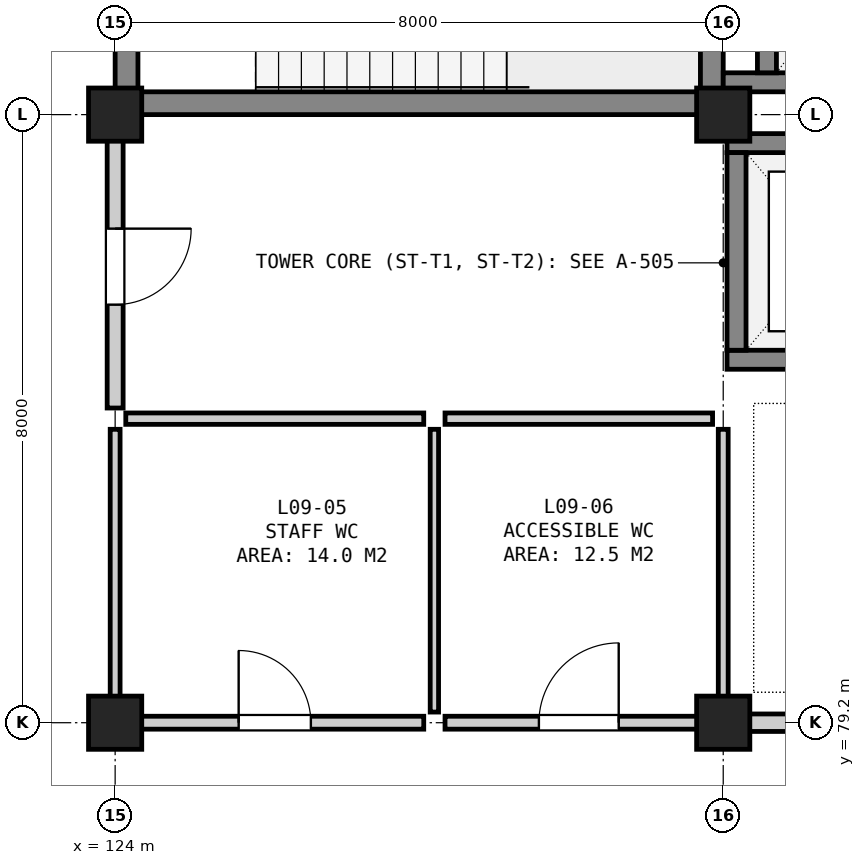
"""IFC4 building model, lengths in metres.
Left out: names, types, materials, properties, quantities, classifications, styles, units other than length and angle.
Written with IfcOpenShell. Run it as: python <this file> out.ifc"""

import sys

from ifc_helpers import new_model, si_unit, direction, frame, frame_2d, origin, origin_2d, place, context, subcontext, project, spatial, rectangle, extrude, element, fill, save


model = new_model("IFC4")
c1 = context("Model", 3, precision=1e-05, world=origin(), true_north=direction((0.0, 1.0)))
c2 = subcontext(c1, "Body", "Model", "MODEL_VIEW")
j1 = project(units=[si_unit("LENGTHUNIT", "METRE"), si_unit("PLANEANGLEUNIT", "RADIAN")], contexts=[c1])
p1 = place(None, origin())
s1 = spatial("IfcSite", under=j1, at=p1, CompositionType="ELEMENT")
p2 = place(p1, origin())
s2 = spatial("IfcBuilding", under=s1, at=p2, CompositionType="ELEMENT")
p3 = place(p2, frame((0.0, 0.0, 39.5)))
s3 = spatial("IfcBuildingStorey", under=s2, at=p3, CompositionType="ELEMENT", Elevation=39.5)
for number, where, z_axis, x_axis in (
    (1, (124.0, 79.2, 0.0), (0.0, 0.0, 1.0), (1.0, 0.0, 0.0)),
    (2, (124.0, 87.2, 0.0), (0.0, 0.0, 1.0), (1.0, 0.0, 0.0)),
    (3, (132.0, 79.2, 0.0), (0.0, 0.0, 1.0), (1.0, 0.0, 0.0)),
    (4, (132.0, 87.2, 0.0), (0.0, 0.0, 1.0), (1.0, 0.0, 0.0)),
):
    element("IfcColumn", number, at=place(p3, frame(where, z_axis=z_axis, x_axis=x_axis)), inside=s3, PredefinedType="COLUMN", context=c2, shape_type="SweptSolid", body=[
        extrude(rectangle(XDim=0.7, YDim=0.7, at=origin_2d()), origin(), (0.0, 0.0, 1.0), 3.8),
    ])
for number, where, z_axis, x_axis in (
    (5, (124.15, 87.2, 0.0), (0.0, 0.0, 1.0), (0.0, 1.0, 0.0)),
    (6, (131.85, 87.2, 0.0), (0.0, 0.0, 1.0), (0.0, 1.0, 0.0)),
):
    element("IfcWall", number, at=place(p3, frame(where, z_axis=z_axis, x_axis=x_axis)), inside=s3, PredefinedType="SHEAR", context=c2, shape_type="SweptSolid", body=[
        extrude(rectangle(XDim=4.2, YDim=0.3, at=frame_2d((2.1, 0.0))), origin(), (0.0, 0.0, 1.0), 3.52),
    ])
p4 = place(p3, frame((124.3, 87.35, 0.0), z_axis=(0.0, 0.0, 1.0), x_axis=(1.0, 0.0, 0.0)))
e7 = element("IfcWall", 7, at=p4, inside=s3, PredefinedType="SHEAR", context=c2, shape_type="SweptSolid", body=[
    extrude(rectangle(XDim=7.4, YDim=0.3, at=frame_2d((3.7, 0.0))), origin(), (0.0, 0.0, 1.0), 3.52),
])
p5 = place(p3, frame((132.0, 87.625, 0.0), z_axis=(0.0, 0.0, 1.0), x_axis=(1.0, 0.0, 0.0)))
e8 = element("IfcWall", 8, at=p5, inside=s3, PredefinedType="SHEAR", context=c2, shape_type="SweptSolid", body=[
    extrude(rectangle(XDim=3.15, YDim=0.25, at=frame_2d((1.575, 0.0))), origin(), (0.0, 0.0, 1.0), 3.52),
])
p6 = place(p3, frame((132.575, 87.75, 0.0), z_axis=(0.0, 0.0, 1.0), x_axis=(0.0, 1.0, 0.0)))
e9 = element("IfcWall", 9, at=p6, inside=s3, PredefinedType="SHEAR", context=c2, shape_type="SweptSolid", body=[
    extrude(rectangle(XDim=2.9, YDim=0.25, at=frame_2d((1.45, 0.0))), origin(), (0.0, 0.0, 1.0), 3.52),
])
p7 = place(p3, frame((132.05, 83.975, 0.0), z_axis=(0.0, 0.0, 1.0), x_axis=(1.0, 0.0, 0.0)))
e10 = element("IfcWall", 10, at=p7, inside=s3, PredefinedType="SHEAR", context=c2, shape_type="SweptSolid", body=[
    extrude(rectangle(XDim=2.7, YDim=0.25, at=frame_2d((1.35, 0.0))), origin(), (0.0, 0.0, 1.0), 3.52),
])
p8 = place(p7, frame((0.8, 0.0, 0.0)))
e11 = element("IfcOpeningElement", 11, at=p8, cuts=e10, PredefinedType="OPENING", context=c2, shape_type="SweptSolid", body=[
    extrude(rectangle(XDim=1.1, YDim=2.15, at=frame_2d((0.55, 1.075))), frame((0.0, 0.137, 0.0), z_axis=(0.0, -1.0, 0.0), x_axis=(1.0, 0.0, 0.0)), (0.0, 0.0, 1.0), 0.274),
])
p9 = place(p3, frame((132.05, 86.825, 0.0), z_axis=(0.0, 0.0, 1.0), x_axis=(1.0, 0.0, 0.0)))
e12 = element("IfcWall", 12, at=p9, inside=s3, PredefinedType="SHEAR", context=c2, shape_type="SweptSolid", body=[
    extrude(rectangle(XDim=2.7, YDim=0.25, at=frame_2d((1.35, 0.0))), origin(), (0.0, 0.0, 1.0), 3.52),
])
p10 = place(p3, frame((132.175, 84.1, 0.0), z_axis=(0.0, 0.0, 1.0), x_axis=(0.0, 1.0, 0.0)))
e13 = element("IfcWall", 13, at=p10, inside=s3, PredefinedType="SHEAR", context=c2, shape_type="SweptSolid", body=[
    extrude(rectangle(XDim=2.6, YDim=0.25, at=frame_2d((1.3, 0.0))), origin(), (0.0, 0.0, 1.0), 3.52),
])
p11 = place(p3, frame((124.14, 79.2, 0.0), z_axis=(0.0, 0.0, 1.0), x_axis=(1.0, 0.0, 0.0)))
e14 = element("IfcWall", 14, at=p11, inside=s3, PredefinedType="PARTITIONING", context=c2, shape_type="SweptSolid", body=[
    extrude(rectangle(XDim=3.92, YDim=0.17, at=frame_2d((1.96, 0.0))), origin(), (0.0, 0.0, 1.0), 2.935),
])
p12 = place(p11, frame((1.485, 0.0, 0.0)))
e15 = element("IfcOpeningElement", 15, at=p12, cuts=e14, PredefinedType="OPENING", context=c2, shape_type="SweptSolid", body=[
    extrude(rectangle(XDim=0.95, YDim=2.15, at=frame_2d((0.475, 1.075))), frame((0.0, 0.097, 0.0), z_axis=(0.0, -1.0, 0.0), x_axis=(1.0, 0.0, 0.0)), (0.0, 0.0, 1.0), 0.194),
])
p13 = place(p3, frame((124.14, 83.2, 0.0), z_axis=(0.0, 0.0, 1.0), x_axis=(1.0, 0.0, 0.0)))
e16 = element("IfcWall", 16, at=p13, inside=s3, PredefinedType="PARTITIONING", context=c2, shape_type="SweptSolid", body=[
    extrude(rectangle(XDim=3.92, YDim=0.15, at=frame_2d((1.96, 0.0))), origin(), (0.0, 0.0, 1.0), 3.52),
])
p14 = place(p3, frame((124.0, 79.34, 0.0), z_axis=(0.0, 0.0, 1.0), x_axis=(0.0, 1.0, 0.0)))
e17 = element("IfcWall", 17, at=p14, inside=s3, PredefinedType="PARTITIONING", context=c2, shape_type="SweptSolid", body=[
    extrude(rectangle(XDim=3.72, YDim=0.13, at=frame_2d((1.86, 0.0))), origin(), (0.0, 0.0, 1.0), 3.035),
])
p15 = place(p3, frame((128.2, 79.34, 0.0), z_axis=(0.0, 0.0, 1.0), x_axis=(0.0, 1.0, 0.0)))
e18 = element("IfcWall", 18, at=p15, inside=s3, PredefinedType="PARTITIONING", context=c2, shape_type="SweptSolid", body=[
    extrude(rectangle(XDim=3.72, YDim=0.11, at=frame_2d((1.86, 0.0))), origin(), (0.0, 0.0, 1.0), 3.52),
])
p16 = place(p3, frame((128.34, 79.2, 0.0), z_axis=(0.0, 0.0, 1.0), x_axis=(1.0, 0.0, 0.0)))
e19 = element("IfcWall", 19, at=p16, inside=s3, PredefinedType="PARTITIONING", context=c2, shape_type="SweptSolid", body=[
    extrude(rectangle(XDim=3.52, YDim=0.17, at=frame_2d((1.76, 0.0))), origin(), (0.0, 0.0, 1.0), 2.935),
])
p17 = place(p16, frame((1.235, 0.0, 0.0)))
e20 = element("IfcOpeningElement", 20, at=p17, cuts=e19, PredefinedType="OPENING", context=c2, shape_type="SweptSolid", body=[
    extrude(rectangle(XDim=1.05, YDim=2.15, at=frame_2d((0.525, 1.075))), frame((0.0, 0.097, 0.0), z_axis=(0.0, -1.0, 0.0), x_axis=(1.0, 0.0, 0.0)), (0.0, 0.0, 1.0), 0.194),
])
p18 = place(p3, frame((128.34, 83.2, 0.0), z_axis=(0.0, 0.0, 1.0), x_axis=(1.0, 0.0, 0.0)))
e21 = element("IfcWall", 21, at=p18, inside=s3, PredefinedType="PARTITIONING", context=c2, shape_type="SweptSolid", body=[
    extrude(rectangle(XDim=3.52, YDim=0.15, at=frame_2d((1.76, 0.0))), origin(), (0.0, 0.0, 1.0), 3.52),
])
p19 = place(p3, frame((132.0, 79.34, 0.0), z_axis=(0.0, 0.0, 1.0), x_axis=(0.0, 1.0, 0.0)))
e22 = element("IfcWall", 22, at=p19, inside=s3, PredefinedType="PARTITIONING", context=c2, shape_type="SweptSolid", body=[
    extrude(rectangle(XDim=3.72, YDim=0.13, at=frame_2d((1.86, 0.0))), origin(), (0.0, 0.0, 1.0), 2.885),
])
p20 = place(p3, frame((124.0, 83.34, 0.0), z_axis=(0.0, 0.0, 1.0), x_axis=(0.0, 1.0, 0.0)))
e23 = element("IfcWall", 23, at=p20, inside=s3, PredefinedType="SOLIDWALL", context=c2, shape_type="SweptSolid", body=[
    extrude(rectangle(XDim=3.72, YDim=0.21, at=frame_2d((1.86, 0.0))), origin(), (0.0, 0.0, 1.0), 3.035),
])
p21 = place(p20, frame((1.36, 0.0, 0.0)))
e24 = element("IfcOpeningElement", 24, at=p21, cuts=e23, PredefinedType="OPENING", context=c2, shape_type="SweptSolid", body=[
    extrude(rectangle(XDim=1.0, YDim=2.15, at=frame_2d((0.5, 1.075))), frame((0.0, 0.117, 0.0), z_axis=(0.0, -1.0, 0.0), x_axis=(1.0, 0.0, 0.0)), (0.0, 0.0, 1.0), 0.234),
])
p22 = place(p3, frame((132.14, 79.2, 0.0), z_axis=(0.0, 0.0, 1.0), x_axis=(1.0, 0.0, 0.0)))
e25 = element("IfcWall", 25, at=p22, inside=s3, PredefinedType="SOLIDWALL", context=c2, shape_type="SweptSolid", body=[
    extrude(rectangle(XDim=7.72, YDim=0.23, at=frame_2d((3.86, 0.0))), origin(), (0.0, 0.0, 1.0), 2.985),
])
p23 = place(p22, frame((3.11, 0.0, 0.0)))
e26 = element("IfcOpeningElement", 26, at=p23, cuts=e25, PredefinedType="OPENING", context=c2, shape_type="SweptSolid", body=[
    extrude(rectangle(XDim=1.5, YDim=2.2, at=frame_2d((0.75, 1.1))), frame((0.0, 0.127, 0.0), z_axis=(0.0, -1.0, 0.0), x_axis=(1.0, 0.0, 0.0)), (0.0, 0.0, 1.0), 0.254),
])
p24 = place(p12, origin())
e27 = element("IfcDoor", 27, at=p24, inside=s3, OperationType="SINGLE_SWING_LEFT", PredefinedType="DOOR", context=c2, shape_type="SweptSolid", body=[
    extrude(rectangle(XDim=0.95, YDim=2.15, at=frame_2d((0.475, 1.075))), frame((0.0, 0.025, 0.0), z_axis=(0.0, -1.0, 0.0), x_axis=(1.0, 0.0, 0.0)), (0.0, 0.0, 1.0), 0.05),
])
fill(e15, e27)
p25 = place(p17, origin())
e28 = element("IfcDoor", 28, at=p25, inside=s3, OperationType="SINGLE_SWING_RIGHT", PredefinedType="DOOR", context=c2, shape_type="SweptSolid", body=[
    extrude(rectangle(XDim=1.05, YDim=2.15, at=frame_2d((0.525, 1.075))), frame((0.0, 0.025, 0.0), z_axis=(0.0, -1.0, 0.0), x_axis=(1.0, 0.0, 0.0)), (0.0, 0.0, 1.0), 0.05),
])
fill(e20, e28)
p26 = place(p21, frame((1.0, 0.0, 0.0), z_axis=(0.0, 0.0, 1.0), x_axis=(-1.0, 0.0, 0.0)))
e29 = element("IfcDoor", 29, at=p26, inside=s3, OperationType="SINGLE_SWING_LEFT", PredefinedType="DOOR", context=c2, shape_type="SweptSolid", body=[
    extrude(rectangle(XDim=1.0, YDim=2.15, at=frame_2d((0.5, 1.075))), frame((0.0, 0.025, 0.0), z_axis=(0.0, -1.0, 0.0), x_axis=(1.0, 0.0, 0.0)), (0.0, 0.0, 1.0), 0.05),
])
fill(e24, e29)
save(model, sys.argv[1])
